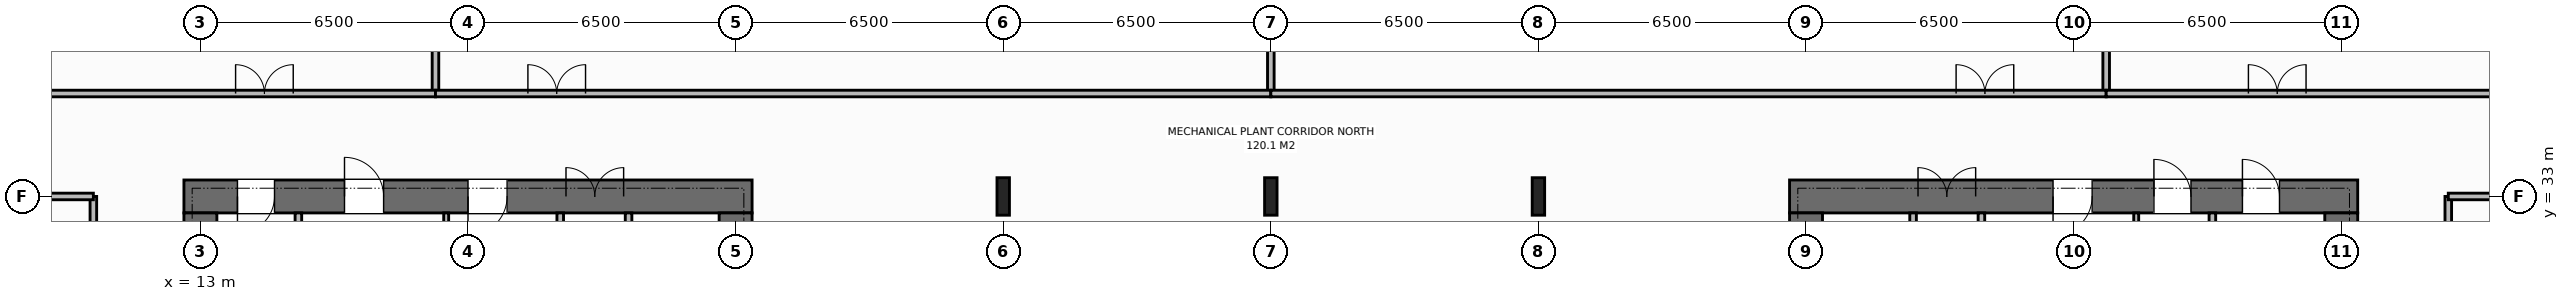
"""IFC4 building model, lengths in metres.
Left out: names, types, materials, properties, quantities, classifications, styles, units other than length and angle.
Written with IfcOpenShell. Run it as: python <this file> out.ifc"""

import sys

from ifc_helpers import new_model, si_unit, direction, frame, frame_2d, origin, origin_2d, place, context, subcontext, project, spatial, rectangle, i_section, extrude, element, fill, save


model = new_model("IFC4")
c1 = context("Model", 3, precision=1e-05, world=origin(), true_north=direction((0.0, 1.0)))
c2 = subcontext(c1, "Body", "Model", "MODEL_VIEW")
j1 = project(units=[si_unit("LENGTHUNIT", "METRE"), si_unit("PLANEANGLEUNIT", "RADIAN")], contexts=[c1])
p1 = place(None, origin())
s1 = spatial("IfcSite", under=j1, at=p1, CompositionType="ELEMENT")
p2 = place(p1, origin())
s2 = spatial("IfcBuilding", under=s1, at=p2, CompositionType="ELEMENT")
p3 = place(p2, frame((0.0, 0.0, 22.0)))
s3 = spatial("IfcBuildingStorey", under=s2, at=p3, CompositionType="ELEMENT", Elevation=22.0)
p4 = place(p3, frame((12.6, 33.0, 0.0), z_axis=(0.0, 0.0, 1.0), x_axis=(1.0, 0.0, 0.0)))
e1 = element("IfcWall", 1, at=p4, inside=s3, PredefinedType="SHEAR", context=c2, shape_type="SweptSolid", body=[
    extrude(rectangle(XDim=13.8, YDim=0.8, at=frame_2d((6.9, 0.0))), origin(), (0.0, 0.0, 1.0), 5.8),
])
p5 = place(p4, frame((1.3, 0.0, 0.0)))
e2 = element("IfcOpeningElement", 2, at=p5, cuts=e1, PredefinedType="OPENING", context=c2, shape_type="SweptSolid", body=[
    extrude(rectangle(XDim=0.9, YDim=2.15, at=frame_2d((0.45, 1.075))), frame((0.0, 0.41, 0.0), z_axis=(0.0, -1.0, 0.0), x_axis=(1.0, 0.0, 0.0)), (0.0, 0.0, 1.0), 0.82),
])
p6 = place(p4, frame((3.9, 0.0, 0.0)))
e3 = element("IfcOpeningElement", 3, at=p6, cuts=e1, PredefinedType="OPENING", context=c2, shape_type="SweptSolid", body=[
    extrude(rectangle(XDim=0.95, YDim=2.15, at=frame_2d((0.475, 1.075))), frame((0.0, 0.41, 0.0), z_axis=(0.0, -1.0, 0.0), x_axis=(1.0, 0.0, 0.0)), (0.0, 0.0, 1.0), 0.82),
])
p7 = place(p4, frame((6.9, 0.0, 0.0)))
e4 = element("IfcOpeningElement", 4, at=p7, cuts=e1, PredefinedType="OPENING", context=c2, shape_type="SweptSolid", body=[
    extrude(rectangle(XDim=0.95, YDim=2.15, at=frame_2d((0.475, 1.075))), frame((0.0, 0.41, 0.0), z_axis=(0.0, -1.0, 0.0), x_axis=(1.0, 0.0, 0.0)), (0.0, 0.0, 1.0), 0.82),
])
p8 = place(p4, frame((9.28, 0.0, 0.0)))
e5 = element("IfcOpeningElement", 5, at=p8, cuts=e1, PredefinedType="OPENING", context=c2, shape_type="SweptSolid", body=[
    extrude(rectangle(XDim=1.4, YDim=2.2, at=frame_2d((0.7, 1.1))), frame((0.0, 0.41, 0.0), z_axis=(0.0, -1.0, 0.0), x_axis=(1.0, 0.0, 0.0)), (0.0, 0.0, 1.0), 0.82),
])
p9 = place(p3, frame((13.0, 19.4, 0.0), z_axis=(0.0, 0.0, 1.0), x_axis=(0.0, 1.0, 0.0)))
e6 = element("IfcWall", 6, at=p9, inside=s3, PredefinedType="SHEAR", context=c2, shape_type="SweptSolid", body=[
    extrude(rectangle(XDim=13.2, YDim=0.8, at=frame_2d((6.6, 0.0))), origin(), (0.0, 0.0, 1.0), 5.8),
])
p10 = place(p9, frame((4.65, 0.0, 0.0)))
e7 = element("IfcOpeningElement", 7, at=p10, cuts=e6, PredefinedType="OPENING", context=c2, shape_type="SweptSolid", body=[
    extrude(rectangle(XDim=1.4, YDim=2.2, at=frame_2d((0.7, 1.1))), frame((0.0, 0.41, 0.0), z_axis=(0.0, -1.0, 0.0), x_axis=(1.0, 0.0, 0.0)), (0.0, 0.0, 1.0), 0.82),
])
p11 = place(p3, frame((26.0, 19.4, 0.0), z_axis=(0.0, 0.0, 1.0), x_axis=(0.0, 1.0, 0.0)))
e8 = element("IfcWall", 8, at=p11, inside=s3, PredefinedType="SHEAR", context=c2, shape_type="SweptSolid", body=[
    extrude(rectangle(XDim=13.2, YDim=0.8, at=frame_2d((6.6, 0.0))), origin(), (0.0, 0.0, 1.0), 5.8),
])
p12 = place(p3, frame((51.6, 33.0, 0.0), z_axis=(0.0, 0.0, 1.0), x_axis=(1.0, 0.0, 0.0)))
e9 = element("IfcWall", 9, at=p12, inside=s3, PredefinedType="SHEAR", context=c2, shape_type="SweptSolid", body=[
    extrude(rectangle(XDim=13.8, YDim=0.8, at=frame_2d((6.9, 0.0))), origin(), (0.0, 0.0, 1.0), 5.8),
])
p13 = place(p12, frame((3.12, 0.0, 0.0)))
e10 = element("IfcOpeningElement", 10, at=p13, cuts=e9, PredefinedType="OPENING", context=c2, shape_type="SweptSolid", body=[
    extrude(rectangle(XDim=1.4, YDim=2.2, at=frame_2d((0.7, 1.1))), frame((0.0, 0.41, 0.0), z_axis=(0.0, -1.0, 0.0), x_axis=(1.0, 0.0, 0.0)), (0.0, 0.0, 1.0), 0.82),
])
p14 = place(p12, frame((11.0, 0.0, 0.0)))
e11 = element("IfcOpeningElement", 11, at=p14, cuts=e9, PredefinedType="OPENING", context=c2, shape_type="SweptSolid", body=[
    extrude(rectangle(XDim=0.9, YDim=2.15, at=frame_2d((0.45, 1.075))), frame((0.0, 0.41, 0.0), z_axis=(0.0, -1.0, 0.0), x_axis=(1.0, 0.0, 0.0)), (0.0, 0.0, 1.0), 0.82),
])
p15 = place(p12, frame((6.4, 0.0, 0.0)))
e12 = element("IfcOpeningElement", 12, at=p15, cuts=e9, PredefinedType="OPENING", context=c2, shape_type="SweptSolid", body=[
    extrude(rectangle(XDim=0.95, YDim=2.15, at=frame_2d((0.475, 1.075))), frame((0.0, 0.41, 0.0), z_axis=(0.0, -1.0, 0.0), x_axis=(1.0, 0.0, 0.0)), (0.0, 0.0, 1.0), 0.82),
])
p16 = place(p12, frame((8.85, 0.0, 0.0)))
e13 = element("IfcOpeningElement", 13, at=p16, cuts=e9, PredefinedType="OPENING", context=c2, shape_type="SweptSolid", body=[
    extrude(rectangle(XDim=0.9, YDim=2.15, at=frame_2d((0.45, 1.075))), frame((0.0, 0.41, 0.0), z_axis=(0.0, -1.0, 0.0), x_axis=(1.0, 0.0, 0.0)), (0.0, 0.0, 1.0), 0.82),
])
p17 = place(p3, frame((52.0, 19.4, 0.0), z_axis=(0.0, 0.0, 1.0), x_axis=(0.0, 1.0, 0.0)))
e14 = element("IfcWall", 14, at=p17, inside=s3, PredefinedType="SHEAR", context=c2, shape_type="SweptSolid", body=[
    extrude(rectangle(XDim=13.2, YDim=0.8, at=frame_2d((6.6, 0.0))), origin(), (0.0, 0.0, 1.0), 5.8),
])
p18 = place(p3, frame((65.0, 19.4, 0.0), z_axis=(0.0, 0.0, 1.0), x_axis=(0.0, 1.0, 0.0)))
e15 = element("IfcWall", 15, at=p18, inside=s3, PredefinedType="SHEAR", context=c2, shape_type="SweptSolid", body=[
    extrude(rectangle(XDim=13.2, YDim=0.8, at=frame_2d((6.6, 0.0))), origin(), (0.0, 0.0, 1.0), 5.8),
])
p19 = place(p18, frame((8.05, 0.0, 0.0)))
e16 = element("IfcOpeningElement", 16, at=p19, cuts=e15, PredefinedType="OPENING", context=c2, shape_type="SweptSolid", body=[
    extrude(rectangle(XDim=1.3, YDim=2.2, at=frame_2d((0.65, 1.1))), frame((0.0, 0.41, 0.0), z_axis=(0.0, -1.0, 0.0), x_axis=(1.0, 0.0, 0.0)), (0.0, 0.0, 1.0), 0.82),
])
for number, where, z_axis, x_axis in (
    (17, (32.5, 33.0, 0.0), (0.0, 0.0, 1.0), (1.0, 0.0, 0.0)),
    (18, (39.0, 33.0, 0.0), (0.0, 0.0, 1.0), (1.0, 0.0, 0.0)),
    (19, (45.5, 33.0, 0.0), (0.0, 0.0, 1.0), (1.0, 0.0, 0.0)),
):
    element("IfcColumn", number, at=place(p3, frame(where, z_axis=z_axis, x_axis=x_axis)), inside=s3, PredefinedType="COLUMN", context=c2, shape_type="SweptSolid", body=[
        extrude(i_section(OverallWidth=0.302, OverallDepth=0.91, WebThickness=0.021, FlangeThickness=0.04, at=origin_2d()), origin(), (0.0, 0.0, 1.0), 5.8),
    ])
p20 = place(p3, frame((15.38, 26.56, 0.0), z_axis=(0.0, 0.0, 1.0), x_axis=(0.0, 1.0, 0.0)))
e20 = element("IfcWall", 20, at=p20, inside=s3, PredefinedType="STANDARD", context=c2, shape_type="SweptSolid", body=[
    extrude(rectangle(XDim=6.04, YDim=0.16, at=frame_2d((3.02, 0.0))), origin(), (0.0, 0.0, 1.0), 5.55),
])
p21 = place(p3, frame((18.97, 26.56, 0.0), z_axis=(0.0, 0.0, 1.0), x_axis=(0.0, 1.0, 0.0)))
e21 = element("IfcWall", 21, at=p21, inside=s3, PredefinedType="PARTITIONING", context=c2, shape_type="SweptSolid", body=[
    extrude(rectangle(XDim=6.04, YDim=0.12, at=frame_2d((3.02, 0.0))), origin(), (0.0, 0.0, 1.0), 5.55),
])
p22 = place(p3, frame((21.74, 26.56, 0.0), z_axis=(0.0, 0.0, 1.0), x_axis=(0.0, 1.0, 0.0)))
e22 = element("IfcWall", 22, at=p22, inside=s3, PredefinedType="STANDARD", context=c2, shape_type="SweptSolid", body=[
    extrude(rectangle(XDim=6.04, YDim=0.16, at=frame_2d((3.02, 0.0))), origin(), (0.0, 0.0, 1.0), 5.55),
])
p23 = place(p3, frame((23.4, 19.4, 0.0), z_axis=(0.0, 0.0, 1.0), x_axis=(0.0, 1.0, 0.0)))
e23 = element("IfcWall", 23, at=p23, inside=s3, PredefinedType="STANDARD", context=c2, shape_type="SweptSolid", body=[
    extrude(rectangle(XDim=13.2, YDim=0.16, at=frame_2d((6.6, 0.0))), origin(), (0.0, 0.0, 1.0), 5.55),
])
p24 = place(p23, frame((0.55, 0.0, 0.0)))
e24 = element("IfcOpeningElement", 24, at=p24, cuts=e23, PredefinedType="OPENING", context=c2, shape_type="SweptSolid", body=[
    extrude(rectangle(XDim=1.1, YDim=2.2, at=frame_2d((0.55, 1.1))), frame((0.0, 0.09, 0.0), z_axis=(0.0, -1.0, 0.0), x_axis=(1.0, 0.0, 0.0)), (0.0, 0.0, 1.0), 0.18),
])
p25 = place(p23, frame((2.7, 0.0, 0.0)))
e25 = element("IfcOpeningElement", 25, at=p25, cuts=e23, PredefinedType="OPENING", context=c2, shape_type="SweptSolid", body=[
    extrude(rectangle(XDim=1.1, YDim=2.2, at=frame_2d((0.55, 1.1))), frame((0.0, 0.09, 0.0), z_axis=(0.0, -1.0, 0.0), x_axis=(1.0, 0.0, 0.0)), (0.0, 0.0, 1.0), 0.18),
])
p26 = place(p3, frame((54.6, 19.4, 0.0), z_axis=(0.0, 0.0, 1.0), x_axis=(0.0, 1.0, 0.0)))
e26 = element("IfcWall", 26, at=p26, inside=s3, PredefinedType="STANDARD", context=c2, shape_type="SweptSolid", body=[
    extrude(rectangle(XDim=13.2, YDim=0.16, at=frame_2d((6.6, 0.0))), origin(), (0.0, 0.0, 1.0), 5.55),
])
p27 = place(p26, frame((0.55, 0.0, 0.0)))
e27 = element("IfcOpeningElement", 27, at=p27, cuts=e26, PredefinedType="OPENING", context=c2, shape_type="SweptSolid", body=[
    extrude(rectangle(XDim=1.1, YDim=2.2, at=frame_2d((0.55, 1.1))), frame((0.0, 0.09, 0.0), z_axis=(0.0, -1.0, 0.0), x_axis=(1.0, 0.0, 0.0)), (0.0, 0.0, 1.0), 0.18),
])
p28 = place(p26, frame((2.7, 0.0, 0.0)))
e28 = element("IfcOpeningElement", 28, at=p28, cuts=e26, PredefinedType="OPENING", context=c2, shape_type="SweptSolid", body=[
    extrude(rectangle(XDim=1.1, YDim=2.2, at=frame_2d((0.55, 1.1))), frame((0.0, 0.09, 0.0), z_axis=(0.0, -1.0, 0.0), x_axis=(1.0, 0.0, 0.0)), (0.0, 0.0, 1.0), 0.18),
])
p29 = place(p3, frame((56.26, 23.09, 0.0), z_axis=(0.0, 0.0, 1.0), x_axis=(0.0, 1.0, 0.0)))
e29 = element("IfcWall", 29, at=p29, inside=s3, PredefinedType="STANDARD", context=c2, shape_type="SweptSolid", body=[
    extrude(rectangle(XDim=9.51, YDim=0.16, at=frame_2d((4.755, 0.0))), origin(), (0.0, 0.0, 1.0), 5.55),
])
p30 = place(p29, frame((1.01, 0.0, 0.0)))
e30 = element("IfcOpeningElement", 30, at=p30, cuts=e29, PredefinedType="OPENING", context=c2, shape_type="SweptSolid", body=[
    extrude(rectangle(XDim=1.3, YDim=2.2, at=frame_2d((0.65, 1.1))), frame((0.0, 0.09, 0.0), z_axis=(0.0, -1.0, 0.0), x_axis=(1.0, 0.0, 0.0)), (0.0, 0.0, 1.0), 0.18),
])
p31 = place(p3, frame((61.87, 26.56, 0.0), z_axis=(0.0, 0.0, 1.0), x_axis=(0.0, 1.0, 0.0)))
e31 = element("IfcWall", 31, at=p31, inside=s3, PredefinedType="STANDARD", context=c2, shape_type="SweptSolid", body=[
    extrude(rectangle(XDim=6.04, YDim=0.16, at=frame_2d((3.02, 0.0))), origin(), (0.0, 0.0, 1.0), 5.55),
])
p32 = place(p3, frame((60.02, 26.56, 0.0), z_axis=(0.0, 0.0, 1.0), x_axis=(0.0, 1.0, 0.0)))
e32 = element("IfcWall", 32, at=p32, inside=s3, PredefinedType="PARTITIONING", context=c2, shape_type="SweptSolid", body=[
    extrude(rectangle(XDim=6.04, YDim=0.12, at=frame_2d((3.02, 0.0))), origin(), (0.0, 0.0, 1.0), 5.55),
])
p33 = place(p3, frame((10.4, 19.0, 0.0), z_axis=(0.0, 0.0, 1.0), x_axis=(0.0, 1.0, 0.0)))
e33 = element("IfcWall", 33, at=p33, inside=s3, PredefinedType="STANDARD", context=c2, shape_type="SweptSolid", body=[
    extrude(rectangle(XDim=14.0, YDim=0.16, at=frame_2d((7.0, 0.0))), origin(), (0.0, 0.0, 1.0), 5.55),
])
p34 = place(p33, frame((5.2, 0.0, 0.0)))
e34 = element("IfcOpeningElement", 34, at=p34, cuts=e33, PredefinedType="OPENING", context=c2, shape_type="SweptSolid", body=[
    extrude(rectangle(XDim=1.4, YDim=2.2, at=frame_2d((0.7, 1.1))), frame((0.0, 0.09, 0.0), z_axis=(0.0, -1.0, 0.0), x_axis=(1.0, 0.0, 0.0)), (0.0, 0.0, 1.0), 0.18),
])
p35 = place(p3, frame((-0.18, 33.0, 0.0), z_axis=(0.0, 0.0, 1.0), x_axis=(1.0, 0.0, 0.0)))
e35 = element("IfcWall", 35, at=p35, inside=s3, PredefinedType="STANDARD", context=c2, shape_type="SweptSolid", body=[
    extrude(rectangle(XDim=10.58, YDim=0.16, at=frame_2d((5.29, 0.0))), origin(), (0.0, 0.0, 1.0), 4.9),
])
p36 = place(p3, frame((67.6, 19.0, 0.0), z_axis=(0.0, 0.0, 1.0), x_axis=(0.0, 1.0, 0.0)))
e36 = element("IfcWall", 36, at=p36, inside=s3, PredefinedType="STANDARD", context=c2, shape_type="SweptSolid", body=[
    extrude(rectangle(XDim=14.0, YDim=0.16, at=frame_2d((7.0, 0.0))), origin(), (0.0, 0.0, 1.0), 5.55),
])
p37 = place(p36, frame((5.2, 0.0, 0.0)))
e37 = element("IfcOpeningElement", 37, at=p37, cuts=e36, PredefinedType="OPENING", context=c2, shape_type="SweptSolid", body=[
    extrude(rectangle(XDim=1.4, YDim=2.2, at=frame_2d((0.7, 1.1))), frame((0.0, 0.09, 0.0), z_axis=(0.0, -1.0, 0.0), x_axis=(1.0, 0.0, 0.0)), (0.0, 0.0, 1.0), 0.18),
])
p38 = place(p3, frame((67.6, 33.0, 0.0), z_axis=(0.0, 0.0, 1.0), x_axis=(1.0, 0.0, 0.0)))
e38 = element("IfcWall", 38, at=p38, inside=s3, PredefinedType="STANDARD", context=c2, shape_type="SweptSolid", body=[
    extrude(rectangle(XDim=10.58, YDim=0.16, at=frame_2d((5.29, 0.0))), origin(), (0.0, 0.0, 1.0), 4.9),
])
p39 = place(p3, frame((18.71, 35.5, 0.0), z_axis=(0.0, 0.0, 1.0), x_axis=(0.0, 1.0, 0.0)))
e39 = element("IfcWall", 39, at=p39, inside=s3, PredefinedType="STANDARD", context=c2, shape_type="SweptSolid", body=[
    extrude(rectangle(XDim=15.41, YDim=0.16, at=frame_2d((7.705, 0.0))), origin(), (0.0, 0.0, 1.0), 5.55),
])
p40 = place(p3, frame((-0.18, 35.5, 0.0), z_axis=(0.0, 0.0, 1.0), x_axis=(1.0, 0.0, 0.0)))
e40 = element("IfcWall", 40, at=p40, inside=s3, PredefinedType="STANDARD", context=c2, shape_type="SweptSolid", body=[
    extrude(rectangle(XDim=18.89, YDim=0.16, at=frame_2d((9.445, 0.0))), origin(), (0.0, 0.0, 1.0), 5.55),
])
p41 = place(p40, frame((14.035, 0.0, 0.0)))
e41 = element("IfcOpeningElement", 41, at=p41, cuts=e40, PredefinedType="OPENING", context=c2, shape_type="SweptSolid", body=[
    extrude(rectangle(XDim=1.4, YDim=2.2, at=frame_2d((0.7, 1.1))), frame((0.0, 0.09, 0.0), z_axis=(0.0, -1.0, 0.0), x_axis=(1.0, 0.0, 0.0)), (0.0, 0.0, 1.0), 0.18),
])
p42 = place(p3, frame((39.0, 35.5, 0.0), z_axis=(0.0, 0.0, 1.0), x_axis=(0.0, 1.0, 0.0)))
e42 = element("IfcWall", 42, at=p42, inside=s3, PredefinedType="STANDARD", context=c2, shape_type="SweptSolid", body=[
    extrude(rectangle(XDim=15.41, YDim=0.16, at=frame_2d((7.705, 0.0))), origin(), (0.0, 0.0, 1.0), 4.9),
])
p43 = place(p3, frame((18.71, 35.5, 0.0), z_axis=(0.0, 0.0, 1.0), x_axis=(1.0, 0.0, 0.0)))
e43 = element("IfcWall", 43, at=p43, inside=s3, PredefinedType="STANDARD", context=c2, shape_type="SweptSolid", body=[
    extrude(rectangle(XDim=20.29, YDim=0.16, at=frame_2d((10.145, 0.0))), origin(), (0.0, 0.0, 1.0), 5.55),
])
p44 = place(p43, frame((2.245, 0.0, 0.0)))
e44 = element("IfcOpeningElement", 44, at=p44, cuts=e43, PredefinedType="OPENING", context=c2, shape_type="SweptSolid", body=[
    extrude(rectangle(XDim=1.4, YDim=2.2, at=frame_2d((0.7, 1.1))), frame((0.0, 0.09, 0.0), z_axis=(0.0, -1.0, 0.0), x_axis=(1.0, 0.0, 0.0)), (0.0, 0.0, 1.0), 0.18),
])
p45 = place(p3, frame((59.29, 35.5, 0.0), z_axis=(0.0, 0.0, 1.0), x_axis=(0.0, 1.0, 0.0)))
e45 = element("IfcWall", 45, at=p45, inside=s3, PredefinedType="STANDARD", context=c2, shape_type="SweptSolid", body=[
    extrude(rectangle(XDim=15.41, YDim=0.16, at=frame_2d((7.705, 0.0))), origin(), (0.0, 0.0, 1.0), 5.55),
])
p46 = place(p3, frame((39.0, 35.5, 0.0), z_axis=(0.0, 0.0, 1.0), x_axis=(1.0, 0.0, 0.0)))
e46 = element("IfcWall", 46, at=p46, inside=s3, PredefinedType="STANDARD", context=c2, shape_type="SweptSolid", body=[
    extrude(rectangle(XDim=20.29, YDim=0.16, at=frame_2d((10.145, 0.0))), origin(), (0.0, 0.0, 1.0), 5.55),
])
p47 = place(p46, frame((16.645, 0.0, 0.0)))
e47 = element("IfcOpeningElement", 47, at=p47, cuts=e46, PredefinedType="OPENING", context=c2, shape_type="SweptSolid", body=[
    extrude(rectangle(XDim=1.4, YDim=2.2, at=frame_2d((0.7, 1.1))), frame((0.0, 0.09, 0.0), z_axis=(0.0, -1.0, 0.0), x_axis=(1.0, 0.0, 0.0)), (0.0, 0.0, 1.0), 0.18),
])
p48 = place(p3, frame((59.29, 35.5, 0.0), z_axis=(0.0, 0.0, 1.0), x_axis=(1.0, 0.0, 0.0)))
e48 = element("IfcWall", 48, at=p48, inside=s3, PredefinedType="STANDARD", context=c2, shape_type="SweptSolid", body=[
    extrude(rectangle(XDim=18.89, YDim=0.16, at=frame_2d((9.445, 0.0))), origin(), (0.0, 0.0, 1.0), 5.55),
])
p49 = place(p48, frame((3.455, 0.0, 0.0)))
e49 = element("IfcOpeningElement", 49, at=p49, cuts=e48, PredefinedType="OPENING", context=c2, shape_type="SweptSolid", body=[
    extrude(rectangle(XDim=1.4, YDim=2.2, at=frame_2d((0.7, 1.1))), frame((0.0, 0.09, 0.0), z_axis=(0.0, -1.0, 0.0), x_axis=(1.0, 0.0, 0.0)), (0.0, 0.0, 1.0), 0.18),
])
p50 = place(p5, origin())
e50 = element("IfcDoor", 50, at=p50, inside=s3, OperationType="SINGLE_SWING_RIGHT", PredefinedType="DOOR", context=c2, shape_type="SweptSolid", body=[
    extrude(rectangle(XDim=0.9, YDim=2.15, at=frame_2d((0.45, 1.075))), frame((0.0, -0.075, 0.0), z_axis=(0.0, -1.0, 0.0), x_axis=(1.0, 0.0, 0.0)), (0.0, 0.0, 1.0), 0.05),
])
fill(e2, e50)
p51 = place(p6, origin())
e51 = element("IfcDoor", 51, at=p51, inside=s3, OperationType="SINGLE_SWING_LEFT", PredefinedType="DOOR", context=c2, shape_type="SweptSolid", body=[
    extrude(rectangle(XDim=0.95, YDim=2.15, at=frame_2d((0.475, 1.075))), frame((0.0, -0.075, 0.0), z_axis=(0.0, -1.0, 0.0), x_axis=(1.0, 0.0, 0.0)), (0.0, 0.0, 1.0), 0.05),
])
fill(e3, e51)
p52 = place(p7, origin())
e52 = element("IfcDoor", 52, at=p52, inside=s3, OperationType="SINGLE_SWING_RIGHT", PredefinedType="DOOR", context=c2, shape_type="SweptSolid", body=[
    extrude(rectangle(XDim=0.95, YDim=2.15, at=frame_2d((0.475, 1.075))), frame((0.0, -0.075, 0.0), z_axis=(0.0, -1.0, 0.0), x_axis=(1.0, 0.0, 0.0)), (0.0, 0.0, 1.0), 0.05),
])
fill(e4, e52)
p53 = place(p8, origin())
e53 = element("IfcDoor", 53, at=p53, inside=s3, OperationType="DOUBLE_DOOR_SINGLE_SWING", PredefinedType="DOOR", context=c2, shape_type="SweptSolid", body=[
    extrude(rectangle(XDim=1.4, YDim=2.2, at=frame_2d((0.7, 1.1))), frame((0.0, -0.075, 0.0), z_axis=(0.0, -1.0, 0.0), x_axis=(1.0, 0.0, 0.0)), (0.0, 0.0, 1.0), 0.05),
])
fill(e5, e53)
p54 = place(p13, origin())
e54 = element("IfcDoor", 54, at=p54, inside=s3, OperationType="DOUBLE_DOOR_SINGLE_SWING", PredefinedType="DOOR", context=c2, shape_type="SweptSolid", body=[
    extrude(rectangle(XDim=1.4, YDim=2.2, at=frame_2d((0.7, 1.1))), frame((0.0, -0.075, 0.0), z_axis=(0.0, -1.0, 0.0), x_axis=(1.0, 0.0, 0.0)), (0.0, 0.0, 1.0), 0.05),
])
fill(e10, e54)
p55 = place(p14, origin())
e55 = element("IfcDoor", 55, at=p55, inside=s3, OperationType="SINGLE_SWING_LEFT", PredefinedType="DOOR", context=c2, shape_type="SweptSolid", body=[
    extrude(rectangle(XDim=0.9, YDim=2.15, at=frame_2d((0.45, 1.075))), frame((0.0, -0.075, 0.0), z_axis=(0.0, -1.0, 0.0), x_axis=(1.0, 0.0, 0.0)), (0.0, 0.0, 1.0), 0.05),
])
fill(e11, e55)
p56 = place(p15, origin())
e56 = element("IfcDoor", 56, at=p56, inside=s3, OperationType="SINGLE_SWING_RIGHT", PredefinedType="DOOR", context=c2, shape_type="SweptSolid", body=[
    extrude(rectangle(XDim=0.95, YDim=2.15, at=frame_2d((0.475, 1.075))), frame((0.0, -0.075, 0.0), z_axis=(0.0, -1.0, 0.0), x_axis=(1.0, 0.0, 0.0)), (0.0, 0.0, 1.0), 0.05),
])
fill(e12, e56)
p57 = place(p16, origin())
e57 = element("IfcDoor", 57, at=p57, inside=s3, OperationType="SINGLE_SWING_LEFT", PredefinedType="DOOR", context=c2, shape_type="SweptSolid", body=[
    extrude(rectangle(XDim=0.9, YDim=2.15, at=frame_2d((0.45, 1.075))), frame((0.0, -0.075, 0.0), z_axis=(0.0, -1.0, 0.0), x_axis=(1.0, 0.0, 0.0)), (0.0, 0.0, 1.0), 0.05),
])
fill(e13, e57)
p58 = place(p41, origin())
e58 = element("IfcDoor", 58, at=p58, inside=s3, OperationType="DOUBLE_DOOR_SINGLE_SWING", PredefinedType="DOOR", context=c2, shape_type="SweptSolid", body=[
    extrude(rectangle(XDim=1.4, YDim=2.2, at=frame_2d((0.7, 1.1))), frame((0.0, 0.025, 0.0), z_axis=(0.0, -1.0, 0.0), x_axis=(1.0, 0.0, 0.0)), (0.0, 0.0, 1.0), 0.05),
])
fill(e41, e58)
p59 = place(p44, origin())
e59 = element("IfcDoor", 59, at=p59, inside=s3, OperationType="DOUBLE_DOOR_SINGLE_SWING", PredefinedType="DOOR", context=c2, shape_type="SweptSolid", body=[
    extrude(rectangle(XDim=1.4, YDim=2.2, at=frame_2d((0.7, 1.1))), frame((0.0, 0.025, 0.0), z_axis=(0.0, -1.0, 0.0), x_axis=(1.0, 0.0, 0.0)), (0.0, 0.0, 1.0), 0.05),
])
fill(e44, e59)
p60 = place(p47, origin())
e60 = element("IfcDoor", 60, at=p60, inside=s3, OperationType="DOUBLE_DOOR_SINGLE_SWING", PredefinedType="DOOR", context=c2, shape_type="SweptSolid", body=[
    extrude(rectangle(XDim=1.4, YDim=2.2, at=frame_2d((0.7, 1.1))), frame((0.0, 0.025, 0.0), z_axis=(0.0, -1.0, 0.0), x_axis=(1.0, 0.0, 0.0)), (0.0, 0.0, 1.0), 0.05),
])
fill(e47, e60)
p61 = place(p49, origin())
e61 = element("IfcDoor", 61, at=p61, inside=s3, OperationType="DOUBLE_DOOR_SINGLE_SWING", PredefinedType="DOOR", context=c2, shape_type="SweptSolid", body=[
    extrude(rectangle(XDim=1.4, YDim=2.2, at=frame_2d((0.7, 1.1))), frame((0.0, 0.025, 0.0), z_axis=(0.0, -1.0, 0.0), x_axis=(1.0, 0.0, 0.0)), (0.0, 0.0, 1.0), 0.05),
])
fill(e49, e61)
save(model, sys.argv[1])
